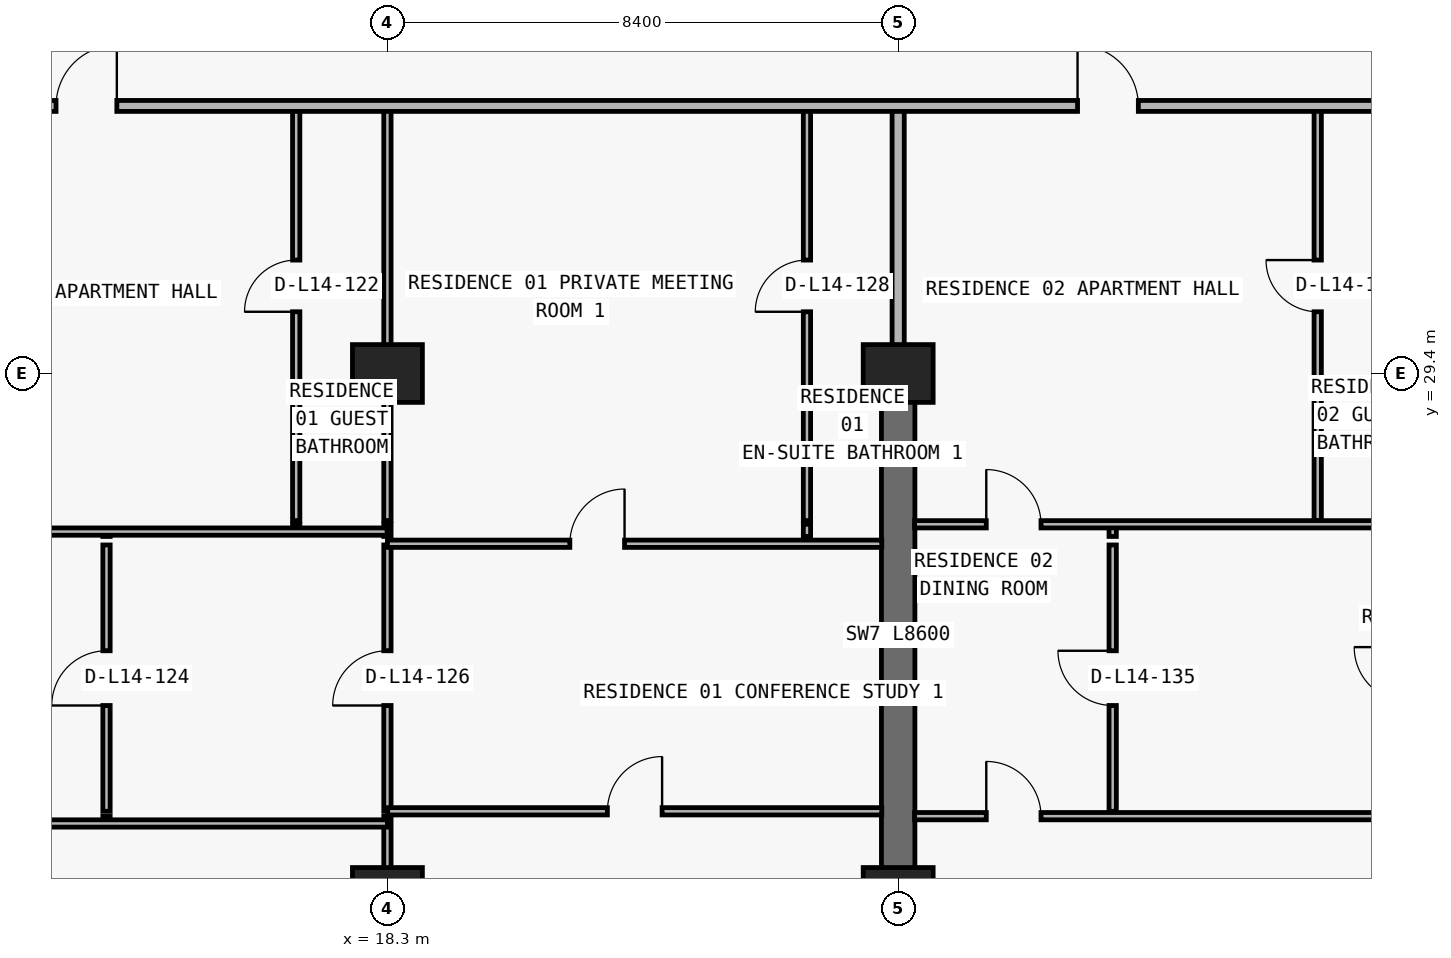
"""IFC4 building model, lengths in metres.
Left out: names, types, materials, properties, quantities, classifications, styles, units other than length and angle.
Written with IfcOpenShell. Run it as: python <this file> out.ifc"""

import sys

from ifc_helpers import new_model, si_unit, direction, frame, frame_2d, origin, origin_2d, place, context, subcontext, project, spatial, rectangle, extrude, element, fill, save


model = new_model("IFC4")
c1 = context("Model", 3, precision=1e-05, world=origin(), true_north=direction((0.0, 1.0)))
c2 = subcontext(c1, "Body", "Model", "MODEL_VIEW")
j1 = project(units=[si_unit("LENGTHUNIT", "METRE"), si_unit("PLANEANGLEUNIT", "RADIAN")], contexts=[c1])
p1 = place(None, origin())
s1 = spatial("IfcSite", under=j1, at=p1, CompositionType="ELEMENT")
p2 = place(p1, origin())
s2 = spatial("IfcBuilding", under=s1, at=p2, CompositionType="ELEMENT")
p3 = place(p2, frame((0.0, 0.0, 56.4)))
s3 = spatial("IfcBuildingStorey", under=s2, at=p3, CompositionType="ELEMENT", Elevation=56.4)
for number, where, z_axis, x_axis in (
    (1, (18.3, 20.8, 0.0), (0.0, 0.0, 1.0), (1.0, 0.0, 0.0)),
    (2, (26.7, 20.8, 0.0), (0.0, 0.0, 1.0), (1.0, 0.0, 0.0)),
    (3, (18.3, 29.4, 0.0), (0.0, 0.0, 1.0), (1.0, 0.0, 0.0)),
    (4, (26.7, 29.4, 0.0), (0.0, 0.0, 1.0), (1.0, 0.0, 0.0)),
):
    element("IfcColumn", number, at=place(p3, frame(where, z_axis=z_axis, x_axis=x_axis)), inside=s3, PredefinedType="COLUMN", context=c2, shape_type="SweptSolid", body=[
        extrude(rectangle(XDim=1.15, YDim=0.95, at=origin_2d()), origin(), (0.0, 0.0, 1.0), 3.05),
    ])
p4 = place(p3, frame((26.7, 20.8, 0.0), z_axis=(0.0, 0.0, 1.0), x_axis=(0.0, 1.0, 0.0)))
e5 = element("IfcWall", 5, at=p4, inside=s3, PredefinedType="SHEAR", context=c2, shape_type="SweptSolid", body=[
    extrude(rectangle(XDim=8.6, YDim=0.55, at=frame_2d((4.3, 0.0))), origin(), (0.0, 0.0, 1.0), 3.05),
])
p5 = place(p3, frame((13.68, 22.0, 0.0), z_axis=(0.0, 0.0, 1.0), x_axis=(0.0, 1.0, 0.0)))
e6 = element("IfcWall", 6, at=p5, inside=s3, PredefinedType="PARTITIONING", context=c2, shape_type="SweptSolid", body=[
    extrude(rectangle(XDim=0.12, YDim=0.12, at=frame_2d((0.06, 0.0))), origin(), (0.0, 0.0, 1.0), 3.05),
])
p6 = place(p3, frame((13.68, 22.2, 0.0), z_axis=(0.0, 0.0, 1.0), x_axis=(0.0, 1.0, 0.0)))
e7 = element("IfcWall", 7, at=p6, inside=s3, PredefinedType="PARTITIONING", context=c2, shape_type="SweptSolid", body=[
    extrude(rectangle(XDim=4.38, YDim=0.12, at=frame_2d((2.19, 0.0))), origin(), (0.0, 0.0, 1.0), 3.05),
])
p7 = place(p6, frame((1.74, 0.0, 0.0)))
e8 = element("IfcOpeningElement", 8, at=p7, cuts=e7, PredefinedType="OPENING", context=c2, shape_type="SweptSolid", body=[
    extrude(rectangle(XDim=0.9, YDim=2.15, at=frame_2d((0.45, 1.075))), frame((0.0, 0.07, 0.0), z_axis=(0.0, -1.0, 0.0), x_axis=(1.0, 0.0, 0.0)), (0.0, 0.0, 1.0), 0.14),
])
p8 = place(p3, frame((13.68, 26.72, 0.0), z_axis=(0.0, 0.0, 1.0), x_axis=(0.0, 1.0, 0.0)))
e9 = element("IfcWall", 9, at=p8, inside=s3, PredefinedType="PARTITIONING", context=c2, shape_type="SweptSolid", body=[
    extrude(rectangle(XDim=0.08, YDim=0.12, at=frame_2d((0.04, 0.0))), origin(), (0.0, 0.0, 1.0), 3.05),
])
p9 = place(p3, frame((16.8, 26.8, 0.0), z_axis=(0.0, 0.0, 1.0), x_axis=(0.0, 1.0, 0.0)))
e10 = element("IfcWall", 10, at=p9, inside=s3, PredefinedType="PARTITIONING", context=c2, shape_type="SweptSolid", body=[
    extrude(rectangle(XDim=0.12, YDim=0.12, at=frame_2d((0.06, 0.0))), origin(), (0.0, 0.0, 1.0), 3.05),
])
p10 = place(p3, frame((16.8, 26.98, 0.0), z_axis=(0.0, 0.0, 1.0), x_axis=(0.0, 1.0, 0.0)))
e11 = element("IfcWall", 11, at=p10, inside=s3, PredefinedType="PARTITIONING", context=c2, shape_type="SweptSolid", body=[
    extrude(rectangle(XDim=6.82, YDim=0.12, at=frame_2d((3.41, 0.0))), origin(), (0.0, 0.0, 1.0), 3.05),
])
p11 = place(p10, frame((3.435, 0.0, 0.0)))
e12 = element("IfcOpeningElement", 12, at=p11, cuts=e11, PredefinedType="OPENING", context=c2, shape_type="SweptSolid", body=[
    extrude(rectangle(XDim=0.85, YDim=2.1, at=frame_2d((0.425, 1.05))), frame((0.0, 0.07, 0.0), z_axis=(0.0, -1.0, 0.0), x_axis=(1.0, 0.0, 0.0)), (0.0, 0.0, 1.0), 0.14),
])
p12 = place(p3, frame((18.3, 6.24, 0.0), z_axis=(0.0, 0.0, 1.0), x_axis=(0.0, 1.0, 0.0)))
e13 = element("IfcWall", 13, at=p12, inside=s3, PredefinedType="PARTITIONING", context=c2, shape_type="SweptSolid", body=[
    extrude(rectangle(XDim=15.88, YDim=0.12, at=frame_2d((7.94, 0.0))), origin(), (0.0, 0.0, 1.0), 2.11),
])
p13 = place(p3, frame((18.3, 22.2, 0.0), z_axis=(0.0, 0.0, 1.0), x_axis=(0.0, 1.0, 0.0)))
e14 = element("IfcWall", 14, at=p13, inside=s3, PredefinedType="PARTITIONING", context=c2, shape_type="SweptSolid", body=[
    extrude(rectangle(XDim=4.38, YDim=0.12, at=frame_2d((2.19, 0.0))), origin(), (0.0, 0.0, 1.0), 2.11),
])
p14 = place(p13, frame((1.74, 0.0, 0.0)))
e15 = element("IfcOpeningElement", 15, at=p14, cuts=e14, PredefinedType="OPENING", context=c2, shape_type="SweptSolid", body=[
    extrude(rectangle(XDim=0.9, YDim=2.06, at=frame_2d((0.45, 1.03))), frame((0.0, 0.07, 0.0), z_axis=(0.0, -1.0, 0.0), x_axis=(1.0, 0.0, 0.0)), (0.0, 0.0, 1.0), 0.14),
])
p15 = place(p3, frame((18.3, 26.72, 0.0), z_axis=(0.0, 0.0, 1.0), x_axis=(0.0, 1.0, 0.0)))
e16 = element("IfcWall", 16, at=p15, inside=s3, PredefinedType="PARTITIONING", context=c2, shape_type="SweptSolid", body=[
    extrude(rectangle(XDim=0.2, YDim=0.12, at=frame_2d((0.1, 0.0))), origin(), (0.0, 0.0, 1.0), 2.11),
])
p16 = place(p3, frame((18.3, 26.98, 0.0), z_axis=(0.0, 0.0, 1.0), x_axis=(0.0, 1.0, 0.0)))
e17 = element("IfcWall", 17, at=p16, inside=s3, PredefinedType="PARTITIONING", context=c2, shape_type="SweptSolid", body=[
    extrude(rectangle(XDim=6.82, YDim=0.12, at=frame_2d((3.41, 0.0))), origin(), (0.0, 0.0, 1.0), 2.11),
])
p17 = place(p3, frame((25.2, 26.72, 0.0), z_axis=(0.0, 0.0, 1.0), x_axis=(0.0, 1.0, 0.0)))
e18 = element("IfcWall", 18, at=p17, inside=s3, PredefinedType="PARTITIONING", context=c2, shape_type="SweptSolid", body=[
    extrude(rectangle(XDim=0.2, YDim=0.12, at=frame_2d((0.1, 0.0))), origin(), (0.0, 0.0, 1.0), 3.05),
])
p18 = place(p3, frame((25.2, 26.98, 0.0), z_axis=(0.0, 0.0, 1.0), x_axis=(0.0, 1.0, 0.0)))
e19 = element("IfcWall", 19, at=p18, inside=s3, PredefinedType="PARTITIONING", context=c2, shape_type="SweptSolid", body=[
    extrude(rectangle(XDim=6.82, YDim=0.12, at=frame_2d((3.41, 0.0))), origin(), (0.0, 0.0, 1.0), 3.05),
])
p19 = place(p18, frame((3.435, 0.0, 0.0)))
e20 = element("IfcOpeningElement", 20, at=p19, cuts=e19, PredefinedType="OPENING", context=c2, shape_type="SweptSolid", body=[
    extrude(rectangle(XDim=0.85, YDim=2.1, at=frame_2d((0.425, 1.05))), frame((0.0, 0.07, 0.0), z_axis=(0.0, -1.0, 0.0), x_axis=(1.0, 0.0, 0.0)), (0.0, 0.0, 1.0), 0.14),
])
p20 = place(p3, frame((26.7, 29.405, 0.0), z_axis=(0.0, 0.0, 1.0), x_axis=(0.0, 1.0, 0.0)))
e21 = element("IfcWall", 21, at=p20, inside=s3, PredefinedType="PARTITIONING", context=c2, shape_type="SweptSolid", body=[
    extrude(rectangle(XDim=4.395, YDim=0.2, at=frame_2d((2.198, 0.0))), origin(), (0.0, 0.0, 1.0), 2.335),
])
p21 = place(p3, frame((30.228, 22.2, 0.0), z_axis=(0.0, 0.0, 1.0), x_axis=(0.0, 1.0, 0.0)))
e22 = element("IfcWall", 22, at=p21, inside=s3, PredefinedType="PARTITIONING", context=c2, shape_type="SweptSolid", body=[
    extrude(rectangle(XDim=4.38, YDim=0.12, at=frame_2d((2.19, 0.0))), origin(), (0.0, 0.0, 1.0), 3.05),
])
p22 = place(p21, frame((1.74, 0.0, 0.0)))
e23 = element("IfcOpeningElement", 23, at=p22, cuts=e22, PredefinedType="OPENING", context=c2, shape_type="SweptSolid", body=[
    extrude(rectangle(XDim=0.9, YDim=2.15, at=frame_2d((0.45, 1.075))), frame((0.0, 0.07, 0.0), z_axis=(0.0, -1.0, 0.0), x_axis=(1.0, 0.0, 0.0)), (0.0, 0.0, 1.0), 0.14),
])
p23 = place(p3, frame((30.228, 26.72, 0.0), z_axis=(0.0, 0.0, 1.0), x_axis=(0.0, 1.0, 0.0)))
e24 = element("IfcWall", 24, at=p23, inside=s3, PredefinedType="PARTITIONING", context=c2, shape_type="SweptSolid", body=[
    extrude(rectangle(XDim=0.2, YDim=0.12, at=frame_2d((0.1, 0.0))), origin(), (0.0, 0.0, 1.0), 3.05),
])
p24 = place(p3, frame((33.6, 26.98, 0.0), z_axis=(0.0, 0.0, 1.0), x_axis=(0.0, 1.0, 0.0)))
e25 = element("IfcWall", 25, at=p24, inside=s3, PredefinedType="PARTITIONING", context=c2, shape_type="SweptSolid", body=[
    extrude(rectangle(XDim=6.82, YDim=0.12, at=frame_2d((3.41, 0.0))), origin(), (0.0, 0.0, 1.0), 3.05),
])
p25 = place(p24, frame((3.435, 0.0, 0.0)))
e26 = element("IfcOpeningElement", 26, at=p25, cuts=e25, PredefinedType="OPENING", context=c2, shape_type="SweptSolid", body=[
    extrude(rectangle(XDim=0.85, YDim=2.1, at=frame_2d((0.425, 1.05))), frame((0.0, 0.07, 0.0), z_axis=(0.0, -1.0, 0.0), x_axis=(1.0, 0.0, 0.0)), (0.0, 0.0, 1.0), 0.14),
])
p26 = place(p3, frame((9.9, 22.0, 0.0), z_axis=(0.0, 0.0, 1.0), x_axis=(1.0, 0.0, 0.0)))
e27 = element("IfcWall", 27, at=p26, inside=s3, PredefinedType="PARTITIONING", context=c2, shape_type="SweptSolid", body=[
    extrude(rectangle(XDim=8.4, YDim=0.12, at=frame_2d((4.2, 0.0))), origin(), (0.0, 0.0, 1.0), 3.05),
])
p27 = place(p26, frame((1.44, 0.0, 0.0)))
e28 = element("IfcOpeningElement", 28, at=p27, cuts=e27, PredefinedType="OPENING", context=c2, shape_type="SweptSolid", body=[
    extrude(rectangle(XDim=0.9, YDim=2.15, at=frame_2d((0.45, 1.075))), frame((0.0, 0.07, 0.0), z_axis=(0.0, -1.0, 0.0), x_axis=(1.0, 0.0, 0.0)), (0.0, 0.0, 1.0), 0.14),
])
p28 = place(p3, frame((26.97, 22.12, 0.0), z_axis=(0.0, 0.0, 1.0), x_axis=(1.0, 0.0, 0.0)))
e29 = element("IfcWall", 29, at=p28, inside=s3, PredefinedType="PARTITIONING", context=c2, shape_type="SweptSolid", body=[
    extrude(rectangle(XDim=8.13, YDim=0.12, at=frame_2d((4.065, 0.0))), origin(), (0.0, 0.0, 1.0), 3.05),
])
p29 = place(p28, frame((1.179, 0.0, 0.0)))
e30 = element("IfcOpeningElement", 30, at=p29, cuts=e29, PredefinedType="OPENING", context=c2, shape_type="SweptSolid", body=[
    extrude(rectangle(XDim=0.9, YDim=2.15, at=frame_2d((0.45, 1.075))), frame((0.0, 0.07, 0.0), z_axis=(0.0, -1.0, 0.0), x_axis=(1.0, 0.0, 0.0)), (0.0, 0.0, 1.0), 0.14),
])
p30 = place(p3, frame((18.305, 22.2, 0.0), z_axis=(0.0, 0.0, 1.0), x_axis=(1.0, 0.0, 0.0)))
e31 = element("IfcWall", 31, at=p30, inside=s3, PredefinedType="PARTITIONING", context=c2, shape_type="SweptSolid", body=[
    extrude(rectangle(XDim=8.125, YDim=0.12, at=frame_2d((4.062, 0.0))), origin(), (0.0, 0.0, 1.0), 3.05),
])
p31 = place(p30, frame((3.613, 0.0, 0.0)))
e32 = element("IfcOpeningElement", 32, at=p31, cuts=e31, PredefinedType="OPENING", context=c2, shape_type="SweptSolid", body=[
    extrude(rectangle(XDim=0.9, YDim=2.15, at=frame_2d((0.45, 1.075))), frame((0.0, 0.07, 0.0), z_axis=(0.0, -1.0, 0.0), x_axis=(1.0, 0.0, 0.0)), (0.0, 0.0, 1.0), 0.14),
])
p32 = place(p3, frame((18.3, 26.6, 0.0), z_axis=(0.0, 0.0, 1.0), x_axis=(1.0, 0.0, 0.0)))
e33 = element("IfcWall", 33, at=p32, inside=s3, PredefinedType="PARTITIONING", context=c2, shape_type="SweptSolid", body=[
    extrude(rectangle(XDim=8.13, YDim=0.12, at=frame_2d((4.065, 0.0))), origin(), (0.0, 0.0, 1.0), 3.05),
])
p33 = place(p32, frame((3.0, 0.0, 0.0)))
e34 = element("IfcOpeningElement", 34, at=p33, cuts=e33, PredefinedType="OPENING", context=c2, shape_type="SweptSolid", body=[
    extrude(rectangle(XDim=0.9, YDim=2.15, at=frame_2d((0.45, 1.075))), frame((0.0, 0.07, 0.0), z_axis=(0.0, -1.0, 0.0), x_axis=(1.0, 0.0, 0.0)), (0.0, 0.0, 1.0), 0.14),
])
p34 = place(p3, frame((9.9, 26.8, 0.0), z_axis=(0.0, 0.0, 1.0), x_axis=(1.0, 0.0, 0.0)))
e35 = element("IfcWall", 35, at=p34, inside=s3, PredefinedType="PARTITIONING", context=c2, shape_type="SweptSolid", body=[
    extrude(rectangle(XDim=8.395, YDim=0.12, at=frame_2d((4.198, 0.0))), origin(), (0.0, 0.0, 1.0), 3.05),
])
p35 = place(p34, frame((1.44, 0.0, 0.0)))
e36 = element("IfcOpeningElement", 36, at=p35, cuts=e35, PredefinedType="OPENING", context=c2, shape_type="SweptSolid", body=[
    extrude(rectangle(XDim=0.9, YDim=2.15, at=frame_2d((0.45, 1.075))), frame((0.0, 0.07, 0.0), z_axis=(0.0, -1.0, 0.0), x_axis=(1.0, 0.0, 0.0)), (0.0, 0.0, 1.0), 0.14),
])
p36 = place(p3, frame((26.97, 26.92, 0.0), z_axis=(0.0, 0.0, 1.0), x_axis=(1.0, 0.0, 0.0)))
e37 = element("IfcWall", 37, at=p36, inside=s3, PredefinedType="PARTITIONING", context=c2, shape_type="SweptSolid", body=[
    extrude(rectangle(XDim=8.13, YDim=0.12, at=frame_2d((4.065, 0.0))), origin(), (0.0, 0.0, 1.0), 3.05),
])
p37 = place(p36, frame((1.179, 0.0, 0.0)))
e38 = element("IfcOpeningElement", 38, at=p37, cuts=e37, PredefinedType="OPENING", context=c2, shape_type="SweptSolid", body=[
    extrude(rectangle(XDim=0.9, YDim=2.15, at=frame_2d((0.45, 1.075))), frame((0.0, 0.07, 0.0), z_axis=(0.0, -1.0, 0.0), x_axis=(1.0, 0.0, 0.0)), (0.0, 0.0, 1.0), 0.14),
])
p38 = place(p3, frame((5.105, 33.8, 0.0), z_axis=(0.0, 0.0, 1.0), x_axis=(1.0, 0.0, 0.0)))
e39 = element("IfcWall", 39, at=p38, inside=s3, PredefinedType="PARTITIONING", context=c2, shape_type="SweptSolid", body=[
    extrude(rectangle(XDim=67.595, YDim=0.18, at=frame_2d((33.797, 0.0))), origin(), (0.0, 0.0, 1.0), 3.05),
])
p39 = place(p38, frame((7.745, 0.0, 0.0)))
e40 = element("IfcOpeningElement", 40, at=p39, cuts=e39, PredefinedType="OPENING", context=c2, shape_type="SweptSolid", body=[
    extrude(rectangle(XDim=1.0, YDim=2.2, at=frame_2d((0.5, 1.1))), frame((0.0, 0.1, 0.0), z_axis=(0.0, -1.0, 0.0), x_axis=(1.0, 0.0, 0.0)), (0.0, 0.0, 1.0), 0.2),
])
p40 = place(p38, frame((24.545, 0.0, 0.0)))
e41 = element("IfcOpeningElement", 41, at=p40, cuts=e39, PredefinedType="OPENING", context=c2, shape_type="SweptSolid", body=[
    extrude(rectangle(XDim=1.0, YDim=2.2, at=frame_2d((0.5, 1.1))), frame((0.0, 0.1, 0.0), z_axis=(0.0, -1.0, 0.0), x_axis=(1.0, 0.0, 0.0)), (0.0, 0.0, 1.0), 0.2),
])
p41 = place(p38, frame((40.47, 0.0, 0.0)))
e42 = element("IfcOpeningElement", 42, at=p41, cuts=e39, PredefinedType="OPENING", context=c2, shape_type="SweptSolid", body=[
    extrude(rectangle(XDim=1.0, YDim=2.2, at=frame_2d((0.5, 1.1))), frame((0.0, 0.1, 0.0), z_axis=(0.0, -1.0, 0.0), x_axis=(1.0, 0.0, 0.0)), (0.0, 0.0, 1.0), 0.2),
])
p42 = place(p38, frame((48.87, 0.0, 0.0)))
e43 = element("IfcOpeningElement", 43, at=p42, cuts=e39, PredefinedType="OPENING", context=c2, shape_type="SweptSolid", body=[
    extrude(rectangle(XDim=1.0, YDim=2.2, at=frame_2d((0.5, 1.1))), frame((0.0, 0.1, 0.0), z_axis=(0.0, -1.0, 0.0), x_axis=(1.0, 0.0, 0.0)), (0.0, 0.0, 1.0), 0.2),
])
p43 = place(p38, frame((57.27, 0.0, 0.0)))
e44 = element("IfcOpeningElement", 44, at=p43, cuts=e39, PredefinedType="OPENING", context=c2, shape_type="SweptSolid", body=[
    extrude(rectangle(XDim=1.0, YDim=2.2, at=frame_2d((0.5, 1.1))), frame((0.0, 0.1, 0.0), z_axis=(0.0, -1.0, 0.0), x_axis=(1.0, 0.0, 0.0)), (0.0, 0.0, 1.0), 0.2),
])
p44 = place(p39, origin())
e45 = element("IfcDoor", 45, at=p44, inside=s3, OperationType="SINGLE_SWING_RIGHT", PredefinedType="DOOR", context=c2, shape_type="SweptSolid", body=[
    extrude(rectangle(XDim=1.0, YDim=2.2, at=frame_2d((0.5, 1.1))), frame((0.0, 0.025, 0.0), z_axis=(0.0, -1.0, 0.0), x_axis=(1.0, 0.0, 0.0)), (0.0, 0.0, 1.0), 0.05),
])
fill(e40, e45)
p45 = place(p11, origin())
e46 = element("IfcDoor", 46, at=p45, inside=s3, OperationType="SINGLE_SWING_LEFT", PredefinedType="DOOR", context=c2, shape_type="SweptSolid", body=[
    extrude(rectangle(XDim=0.85, YDim=2.1, at=frame_2d((0.425, 1.05))), frame((0.0, 0.025, 0.0), z_axis=(0.0, -1.0, 0.0), x_axis=(1.0, 0.0, 0.0)), (0.0, 0.0, 1.0), 0.05),
])
fill(e12, e46)
p46 = place(p7, origin())
e47 = element("IfcDoor", 47, at=p46, inside=s3, OperationType="SINGLE_SWING_LEFT", PredefinedType="DOOR", context=c2, shape_type="SweptSolid", body=[
    extrude(rectangle(XDim=0.9, YDim=2.15, at=frame_2d((0.45, 1.075))), frame((0.0, 0.025, 0.0), z_axis=(0.0, -1.0, 0.0), x_axis=(1.0, 0.0, 0.0)), (0.0, 0.0, 1.0), 0.05),
])
fill(e8, e47)
p47 = place(p14, origin())
e48 = element("IfcDoor", 48, at=p47, inside=s3, OperationType="SINGLE_SWING_LEFT", PredefinedType="DOOR", context=c2, shape_type="SweptSolid", body=[
    extrude(rectangle(XDim=0.9, YDim=2.06, at=frame_2d((0.45, 1.03))), frame((0.0, 0.025, 0.0), z_axis=(0.0, -1.0, 0.0), x_axis=(1.0, 0.0, 0.0)), (0.0, 0.0, 1.0), 0.05),
])
fill(e15, e48)
p48 = place(p33, origin())
e49 = element("IfcDoor", 49, at=p48, inside=s3, OperationType="SINGLE_SWING_RIGHT", PredefinedType="DOOR", context=c2, shape_type="SweptSolid", body=[
    extrude(rectangle(XDim=0.9, YDim=2.15, at=frame_2d((0.45, 1.075))), frame((0.0, 0.025, 0.0), z_axis=(0.0, -1.0, 0.0), x_axis=(1.0, 0.0, 0.0)), (0.0, 0.0, 1.0), 0.05),
])
fill(e34, e49)
p49 = place(p19, origin())
e50 = element("IfcDoor", 50, at=p49, inside=s3, OperationType="SINGLE_SWING_LEFT", PredefinedType="DOOR", context=c2, shape_type="SweptSolid", body=[
    extrude(rectangle(XDim=0.85, YDim=2.1, at=frame_2d((0.425, 1.05))), frame((0.0, 0.025, 0.0), z_axis=(0.0, -1.0, 0.0), x_axis=(1.0, 0.0, 0.0)), (0.0, 0.0, 1.0), 0.05),
])
fill(e20, e50)
p50 = place(p31, origin())
e51 = element("IfcDoor", 51, at=p50, inside=s3, OperationType="SINGLE_SWING_RIGHT", PredefinedType="DOOR", context=c2, shape_type="SweptSolid", body=[
    extrude(rectangle(XDim=0.9, YDim=2.15, at=frame_2d((0.45, 1.075))), frame((0.0, 0.025, 0.0), z_axis=(0.0, -1.0, 0.0), x_axis=(1.0, 0.0, 0.0)), (0.0, 0.0, 1.0), 0.05),
])
fill(e32, e51)
p51 = place(p40, origin())
e52 = element("IfcDoor", 52, at=p51, inside=s3, OperationType="SINGLE_SWING_LEFT", PredefinedType="DOOR", context=c2, shape_type="SweptSolid", body=[
    extrude(rectangle(XDim=1.0, YDim=2.2, at=frame_2d((0.5, 1.1))), frame((0.0, 0.025, 0.0), z_axis=(0.0, -1.0, 0.0), x_axis=(1.0, 0.0, 0.0)), (0.0, 0.0, 1.0), 0.05),
])
fill(e41, e52)
p52 = place(p25, origin())
e53 = element("IfcDoor", 53, at=p52, inside=s3, OperationType="SINGLE_SWING_RIGHT", PredefinedType="DOOR", context=c2, shape_type="SweptSolid", body=[
    extrude(rectangle(XDim=0.85, YDim=2.1, at=frame_2d((0.425, 1.05))), frame((0.0, 0.025, 0.0), z_axis=(0.0, -1.0, 0.0), x_axis=(1.0, 0.0, 0.0)), (0.0, 0.0, 1.0), 0.05),
])
fill(e26, e53)
p53 = place(p37, origin())
e54 = element("IfcDoor", 54, at=p53, inside=s3, OperationType="SINGLE_SWING_LEFT", PredefinedType="DOOR", context=c2, shape_type="SweptSolid", body=[
    extrude(rectangle(XDim=0.9, YDim=2.15, at=frame_2d((0.45, 1.075))), frame((0.0, 0.025, 0.0), z_axis=(0.0, -1.0, 0.0), x_axis=(1.0, 0.0, 0.0)), (0.0, 0.0, 1.0), 0.05),
])
fill(e38, e54)
p54 = place(p22, origin())
e55 = element("IfcDoor", 55, at=p54, inside=s3, OperationType="SINGLE_SWING_RIGHT", PredefinedType="DOOR", context=c2, shape_type="SweptSolid", body=[
    extrude(rectangle(XDim=0.9, YDim=2.15, at=frame_2d((0.45, 1.075))), frame((0.0, 0.025, 0.0), z_axis=(0.0, -1.0, 0.0), x_axis=(1.0, 0.0, 0.0)), (0.0, 0.0, 1.0), 0.05),
])
fill(e23, e55)
p55 = place(p29, origin())
e56 = element("IfcDoor", 56, at=p55, inside=s3, OperationType="SINGLE_SWING_LEFT", PredefinedType="DOOR", context=c2, shape_type="SweptSolid", body=[
    extrude(rectangle(XDim=0.9, YDim=2.15, at=frame_2d((0.45, 1.075))), frame((0.0, 0.025, 0.0), z_axis=(0.0, -1.0, 0.0), x_axis=(1.0, 0.0, 0.0)), (0.0, 0.0, 1.0), 0.05),
])
fill(e30, e56)
save(model, sys.argv[1])
